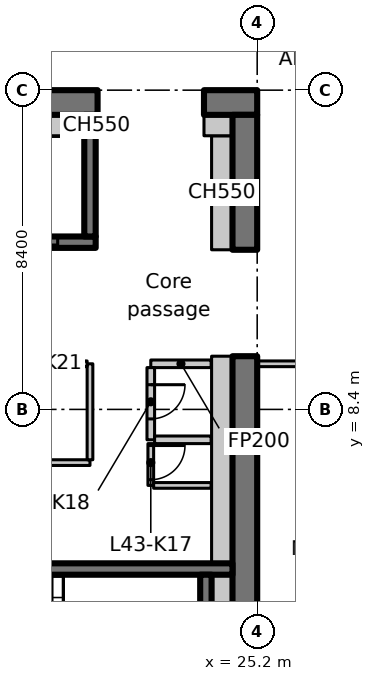
"""IFC4 building model, lengths in metres.
Left out: names, types, materials, properties, quantities, classifications, styles, units other than length and angle.
Written with IfcOpenShell. Run it as: python <this file> out.ifc"""

import sys

from ifc_helpers import new_model, si_unit, direction, frame, frame_2d, origin, place, context, subcontext, project, spatial, rectangle, extrude, element, fill, save


model = new_model("IFC4")
c1 = context("Model", 3, precision=1e-05, world=origin(), true_north=direction((0.0, 1.0)))
c2 = subcontext(c1, "Body", "Model", "MODEL_VIEW")
j1 = project(units=[si_unit("LENGTHUNIT", "METRE"), si_unit("PLANEANGLEUNIT", "RADIAN")], contexts=[c1])
p1 = place(None, origin())
s1 = spatial("IfcSite", under=j1, at=p1, CompositionType="ELEMENT")
p2 = place(p1, origin())
s2 = spatial("IfcBuilding", under=s1, at=p2, CompositionType="ELEMENT")
p3 = place(p2, frame((0.0, 0.0, 174.0)))
s3 = spatial("IfcBuildingStorey", under=s2, at=p3, CompositionType="ELEMENT", Elevation=174.0)
p4 = place(p3, frame((-1.1, 16.475, 0.0), z_axis=(0.0, 0.0, 1.0), x_axis=(1.0, 0.0, 0.0)))
e1 = element("IfcWall", 1, at=p4, inside=s3, PredefinedType="SHEAR", context=c2, shape_type="SweptSolid", body=[
    extrude(rectangle(XDim=22.1, YDim=0.65, at=frame_2d((11.05, 0.0))), origin(), (0.0, 0.0, 1.0), 3.35),
])
p5 = place(p4, frame((3.15, 0.0, 0.0)))
e2 = element("IfcOpeningElement", 2, at=p5, cuts=e1, PredefinedType="OPENING", context=c2, shape_type="SweptSolid", body=[
    extrude(rectangle(XDim=1.1, YDim=2.3, at=frame_2d((0.55, 1.15))), frame((0.0, 0.335, 0.0), z_axis=(0.0, -1.0, 0.0), x_axis=(1.0, 0.0, 0.0)), (0.0, 0.0, 1.0), 0.67),
])
p6 = place(p3, frame((23.8, 16.475, 0.0), z_axis=(0.0, 0.0, 1.0), x_axis=(1.0, 0.0, 0.0)))
e3 = element("IfcWall", 3, at=p6, inside=s3, PredefinedType="SHEAR", context=c2, shape_type="SweptSolid", body=[
    extrude(rectangle(XDim=1.4, YDim=0.65, at=frame_2d((0.7, 0.0))), origin(), (0.0, 0.0, 1.0), 3.35),
])
p7 = place(p3, frame((24.875, 0.65, 0.0), z_axis=(0.0, 0.0, 1.0), x_axis=(0.0, 1.0, 0.0)))
e4 = element("IfcWall", 4, at=p7, inside=s3, PredefinedType="SHEAR", context=c2, shape_type="SweptSolid", body=[
    extrude(rectangle(XDim=9.15, YDim=0.65, at=frame_2d((4.575, 0.0))), origin(), (0.0, 0.0, 1.0), 3.35),
])
p8 = place(p3, frame((24.875, 12.6, 0.0), z_axis=(0.0, 0.0, 1.0), x_axis=(0.0, 1.0, 0.0)))
e5 = element("IfcWall", 5, at=p8, inside=s3, PredefinedType="SHEAR", context=c2, shape_type="SweptSolid", body=[
    extrude(rectangle(XDim=3.55, YDim=0.65, at=frame_2d((1.775, 0.0))), origin(), (0.0, 0.0, 1.0), 3.35),
])
p9 = place(p3, frame((24.275, 12.6, 0.0), z_axis=(0.0, 0.0, 1.0), x_axis=(0.0, 1.0, 0.0)))
e6 = element("IfcWall", 6, at=p9, inside=s3, PredefinedType="PARTITIONING", context=c2, shape_type="SweptSolid", body=[
    extrude(rectangle(XDim=3.0, YDim=0.55, at=frame_2d((1.5, 0.0))), origin(), (0.0, 0.0, 1.0), 3.35),
])
p10 = place(p3, frame((23.8, 15.875, 0.0), z_axis=(0.0, 0.0, 1.0), x_axis=(1.0, 0.0, 0.0)))
e7 = element("IfcWall", 7, at=p10, inside=s3, PredefinedType="PARTITIONING", context=c2, shape_type="SweptSolid", body=[
    extrude(rectangle(XDim=0.75, YDim=0.55, at=frame_2d((0.375, 0.0))), origin(), (0.0, 0.0, 1.0), 3.35),
])
p11 = place(p3, frame((17.85, 12.8, 0.0), z_axis=(0.0, 0.0, 1.0), x_axis=(1.0, 0.0, 0.0)))
e8 = element("IfcWall", 8, at=p11, inside=s3, PredefinedType="SHEAR", context=c2, shape_type="SweptSolid", body=[
    extrude(rectangle(XDim=3.1, YDim=0.3, at=frame_2d((1.55, 0.0))), origin(), (0.0, 0.0, 1.0), 3.35),
])
p12 = place(p11, frame((1.0, 0.0, 0.0)))
e9 = element("IfcOpeningElement", 9, at=p12, cuts=e8, PredefinedType="OPENING", context=c2, shape_type="SweptSolid", body=[
    extrude(rectangle(XDim=1.1, YDim=2.3, at=frame_2d((0.55, 1.15))), frame((0.0, 0.16, 0.0), z_axis=(0.0, -1.0, 0.0), x_axis=(1.0, 0.0, 0.0)), (0.0, 0.0, 1.0), 0.32),
])
p13 = place(p3, frame((20.8, 12.95, 0.0), z_axis=(0.0, 0.0, 1.0), x_axis=(0.0, 1.0, 0.0)))
e10 = element("IfcWall", 10, at=p13, inside=s3, PredefinedType="SHEAR", context=c2, shape_type="SweptSolid", body=[
    extrude(rectangle(XDim=3.2, YDim=0.3, at=frame_2d((1.6, 0.0))), origin(), (0.0, 0.0, 1.0), 3.35),
])
p14 = place(p3, frame((15.8, 4.2, 0.0), z_axis=(0.0, 0.0, 1.0), x_axis=(1.0, 0.0, 0.0)))
e11 = element("IfcWall", 11, at=p14, inside=s3, PredefinedType="SHEAR", context=c2, shape_type="SweptSolid", body=[
    extrude(rectangle(XDim=8.75, YDim=0.3, at=frame_2d((4.375, 0.0))), origin(), (0.0, 0.0, 1.0), 3.35),
])
p15 = place(p14, frame((0.4, 0.0, 0.0)))
e12 = element("IfcOpeningElement", 12, at=p15, cuts=e11, PredefinedType="OPENING", context=c2, shape_type="SweptSolid", body=[
    extrude(rectangle(XDim=1.0, YDim=2.1, at=frame_2d((0.5, 1.05))), frame((0.0, 0.16, 0.0), z_axis=(0.0, -1.0, 0.0), x_axis=(1.0, 0.0, 0.0)), (0.0, 0.0, 1.0), 0.32),
])
p16 = place(p3, frame((23.85, 1.5, 0.0), z_axis=(0.0, 0.0, 1.0), x_axis=(0.0, 1.0, 0.0)))
e13 = element("IfcWall", 13, at=p16, inside=s3, PredefinedType="SHEAR", context=c2, shape_type="SweptSolid", body=[
    extrude(rectangle(XDim=2.55, YDim=0.3, at=frame_2d((1.275, 0.0))), origin(), (0.0, 0.0, 1.0), 3.35),
])
p17 = place(p3, frame((23.988, 9.6, 0.0), z_axis=(0.0, 0.0, 1.0), x_axis=(-1.0, 0.0, 0.0)))
e14 = element("IfcWall", 14, at=p17, inside=s3, PredefinedType="PARTITIONING", context=c2, shape_type="SweptSolid", body=[
    extrude(rectangle(XDim=1.588, YDim=0.2, at=frame_2d((0.794, 0.0))), origin(), (0.0, 0.0, 1.0), 3.35),
])
p18 = place(p3, frame((22.4, 9.5, 0.0), z_axis=(0.0, 0.0, 1.0), x_axis=(0.0, -1.0, 0.0)))
e15 = element("IfcWall", 15, at=p18, inside=s3, PredefinedType="PARTITIONING", context=c2, shape_type="SweptSolid", body=[
    extrude(rectangle(XDim=1.9, YDim=0.2, at=frame_2d((0.95, 0.0))), origin(), (0.0, 0.0, 1.0), 3.35),
])
p19 = place(p18, frame((0.45, 0.0, 0.0)))
e16 = element("IfcOpeningElement", 16, at=p19, cuts=e15, PredefinedType="OPENING", context=c2, shape_type="SweptSolid", body=[
    extrude(rectangle(XDim=0.9, YDim=2.1, at=frame_2d((0.45, 1.05))), frame((0.0, 0.11, 0.0), z_axis=(0.0, -1.0, 0.0), x_axis=(1.0, 0.0, 0.0)), (0.0, 0.0, 1.0), 0.22),
])
p20 = place(p3, frame((22.5, 7.6, 0.0), z_axis=(0.0, 0.0, 1.0), x_axis=(1.0, 0.0, 0.0)))
e17 = element("IfcWall", 17, at=p20, inside=s3, PredefinedType="PARTITIONING", context=c2, shape_type="SweptSolid", body=[
    extrude(rectangle(XDim=1.488, YDim=0.2, at=frame_2d((0.744, 0.0))), origin(), (0.0, 0.0, 1.0), 3.35),
])
p21 = place(p3, frame((12.5, 7.0, 0.0), z_axis=(0.0, 0.0, 1.0), x_axis=(1.0, 0.0, 0.0)))
e18 = element("IfcWall", 18, at=p21, inside=s3, PredefinedType="PARTITIONING", context=c2, shape_type="SweptSolid", body=[
    extrude(rectangle(XDim=8.3, YDim=0.15, at=frame_2d((4.15, 0.0))), origin(), (0.0, 0.0, 1.0), 3.35),
])
p22 = place(p3, frame((20.8, 7.075, 0.0), z_axis=(0.0, 0.0, 1.0), x_axis=(0.0, 1.0, 0.0)))
e19 = element("IfcWall", 19, at=p22, inside=s3, PredefinedType="PARTITIONING", context=c2, shape_type="SweptSolid", body=[
    extrude(rectangle(XDim=2.525, YDim=0.15, at=frame_2d((1.263, 0.0))), origin(), (0.0, 0.0, 1.0), 3.35),
])
p23 = place(p3, frame((20.725, 9.6, 0.0), z_axis=(0.0, 0.0, 1.0), x_axis=(-1.0, 0.0, 0.0)))
e20 = element("IfcWall", 20, at=p23, inside=s3, PredefinedType="PARTITIONING", context=c2, shape_type="SweptSolid", body=[
    extrude(rectangle(XDim=8.225, YDim=0.15, at=frame_2d((4.113, 0.0))), origin(), (0.0, 0.0, 1.0), 3.35),
])
p24 = place(p23, frame((3.675, 0.0, 0.0)))
e21 = element("IfcOpeningElement", 21, at=p24, cuts=e20, PredefinedType="OPENING", context=c2, shape_type="SweptSolid", body=[
    extrude(rectangle(XDim=0.9, YDim=2.1, at=frame_2d((0.45, 1.05))), frame((0.0, 0.085, 0.0), z_axis=(0.0, -1.0, 0.0), x_axis=(1.0, 0.0, 0.0)), (0.0, 0.0, 1.0), 0.17),
])
p25 = place(p3, frame((22.4, 7.5, 0.0), z_axis=(0.0, 0.0, 1.0), x_axis=(0.0, -1.0, 0.0)))
e22 = element("IfcWall", 22, at=p25, inside=s3, PredefinedType="PARTITIONING", context=c2, shape_type="SweptSolid", body=[
    extrude(rectangle(XDim=1.1, YDim=0.15, at=frame_2d((0.55, 0.0))), origin(), (0.0, 0.0, 1.0), 3.35),
])
p26 = place(p25, frame((0.05, 0.0, 0.0)))
e23 = element("IfcOpeningElement", 23, at=p26, cuts=e22, PredefinedType="OPENING", context=c2, shape_type="SweptSolid", body=[
    extrude(rectangle(XDim=0.9, YDim=2.1, at=frame_2d((0.45, 1.05))), frame((0.0, 0.085, 0.0), z_axis=(0.0, -1.0, 0.0), x_axis=(1.0, 0.0, 0.0)), (0.0, 0.0, 1.0), 0.17),
])
p27 = place(p3, frame((22.475, 6.4, 0.0), z_axis=(0.0, 0.0, 1.0), x_axis=(1.0, 0.0, 0.0)))
e24 = element("IfcWall", 24, at=p27, inside=s3, PredefinedType="PARTITIONING", context=c2, shape_type="SweptSolid", body=[
    extrude(rectangle(XDim=1.513, YDim=0.15, at=frame_2d((0.756, 0.0))), origin(), (0.0, 0.0, 1.0), 3.35),
])
p28 = place(p3, frame((18.15, 15.875, 0.0), z_axis=(0.0, 0.0, 1.0), x_axis=(1.0, 0.0, 0.0)))
e25 = element("IfcWall", 25, at=p28, inside=s3, PredefinedType="PARTITIONING", context=c2, shape_type="SweptSolid", body=[
    extrude(rectangle(XDim=2.5, YDim=0.55, at=frame_2d((1.25, 0.0))), origin(), (0.0, 0.0, 1.0), 3.35),
])
p29 = place(p3, frame((20.95, 15.875, 0.0), z_axis=(0.0, 0.0, 1.0), x_axis=(1.0, 0.0, 0.0)))
e26 = element("IfcWall", 26, at=p29, inside=s3, PredefinedType="PARTITIONING", context=c2, shape_type="SweptSolid", body=[
    extrude(rectangle(XDim=0.05, YDim=0.55, at=frame_2d((0.025, 0.0))), origin(), (0.0, 0.0, 1.0), 3.35),
])
p30 = place(p3, frame((24.275, 1.5, 0.0), z_axis=(0.0, 0.0, 1.0), x_axis=(0.0, 1.0, 0.0)))
e27 = element("IfcWall", 27, at=p30, inside=s3, PredefinedType="PARTITIONING", context=c2, shape_type="SweptSolid", body=[
    extrude(rectangle(XDim=2.55, YDim=0.55, at=frame_2d((1.275, 0.0))), origin(), (0.0, 0.0, 1.0), 3.35),
])
p31 = place(p3, frame((24.275, 4.35, 0.0), z_axis=(0.0, 0.0, 1.0), x_axis=(0.0, 1.0, 0.0)))
e28 = element("IfcWall", 28, at=p31, inside=s3, PredefinedType="PARTITIONING", context=c2, shape_type="SweptSolid", body=[
    extrude(rectangle(XDim=5.45, YDim=0.55, at=frame_2d((2.725, 0.0))), origin(), (0.0, 0.0, 1.0), 3.35),
])
p32 = place(p3, frame((29.4, 9.6, 0.0), z_axis=(0.0, 0.0, 1.0), x_axis=(-1.0, 0.0, 0.0)))
e29 = element("IfcWall", 29, at=p32, inside=s3, PredefinedType="PARTITIONING", context=c2, shape_type="SweptSolid", body=[
    extrude(rectangle(XDim=4.2, YDim=0.15, at=frame_2d((2.1, 0.0))), origin(), (0.0, 0.0, 1.0), 3.33),
])
p33 = place(p32, frame((1.5, 0.0, 0.0)))
e30 = element("IfcOpeningElement", 30, at=p33, cuts=e29, PredefinedType="OPENING", context=c2, shape_type="SweptSolid", body=[
    extrude(rectangle(XDim=1.1, YDim=2.1, at=frame_2d((0.55, 1.05))), frame((0.0, 0.085, 0.0), z_axis=(0.0, -1.0, 0.0), x_axis=(1.0, 0.0, 0.0)), (0.0, 0.0, 1.0), 0.17),
])
p34 = place(p12, origin())
e31 = element("IfcDoor", 31, at=p34, inside=s3, OperationType="SLIDING_TO_LEFT", PredefinedType="DOOR", context=c2, shape_type="SweptSolid", body=[
    extrude(rectangle(XDim=1.1, YDim=2.3, at=frame_2d((0.55, 1.15))), frame((0.0, 0.025, 0.0), z_axis=(0.0, -1.0, 0.0), x_axis=(1.0, 0.0, 0.0)), (0.0, 0.0, 1.0), 0.05),
])
fill(e9, e31)
p35 = place(p26, origin())
e32 = element("IfcDoor", 32, at=p35, inside=s3, OperationType="SINGLE_SWING_LEFT", PredefinedType="DOOR", context=c2, shape_type="SweptSolid", body=[
    extrude(rectangle(XDim=0.9, YDim=2.1, at=frame_2d((0.45, 1.05))), frame((0.0, 0.025, 0.0), z_axis=(0.0, -1.0, 0.0), x_axis=(1.0, 0.0, 0.0)), (0.0, 0.0, 1.0), 0.05),
])
fill(e23, e32)
p36 = place(p19, origin())
e33 = element("IfcDoor", 33, at=p36, inside=s3, OperationType="SINGLE_SWING_RIGHT", PredefinedType="DOOR", context=c2, shape_type="SweptSolid", body=[
    extrude(rectangle(XDim=0.9, YDim=2.1, at=frame_2d((0.45, 1.05))), frame((0.0, 0.025, 0.0), z_axis=(0.0, -1.0, 0.0), x_axis=(1.0, 0.0, 0.0)), (0.0, 0.0, 1.0), 0.05),
])
fill(e16, e33)
save(model, sys.argv[1])
